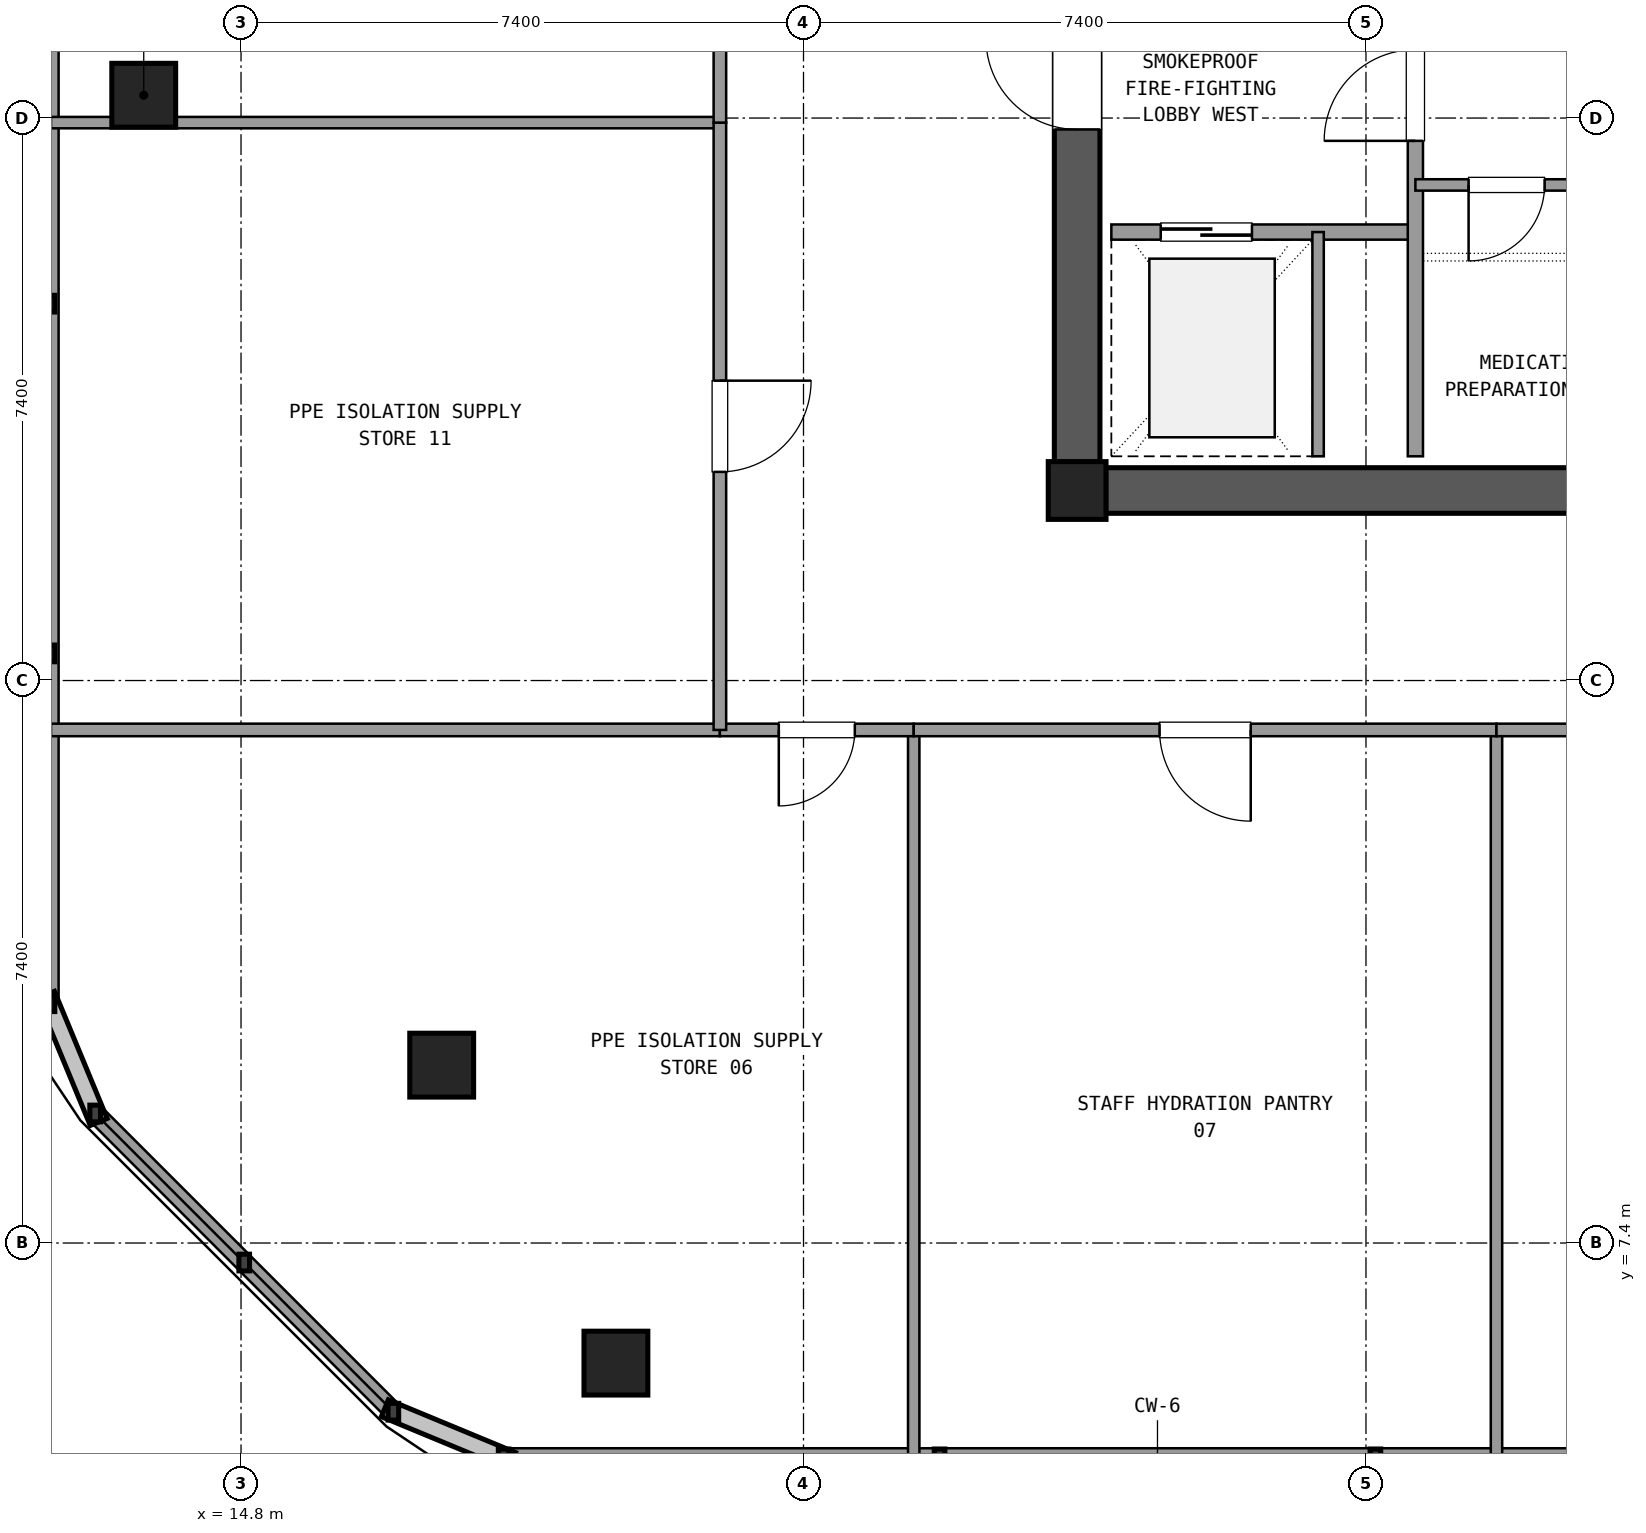
"""IFC4 building model, lengths in metres.
Left out: names, types, materials, properties, quantities, classifications, styles, units other than length and angle.
Written with IfcOpenShell. Run it as: python <this file> out.ifc"""

import sys

from ifc_helpers import new_model, si_unit, direction, frame, frame_2d, origin, origin_2d, place, context, subcontext, project, spatial, rectangle, extrude, element, fill, save


model = new_model("IFC4")
c1 = context("Model", 3, precision=1e-05, world=origin(), true_north=direction((0.0, 1.0)))
c2 = subcontext(c1, "Body", "Model", "MODEL_VIEW")
j1 = project(units=[si_unit("LENGTHUNIT", "METRE"), si_unit("PLANEANGLEUNIT", "RADIAN")], contexts=[c1])
p1 = place(None, origin())
s1 = spatial("IfcSite", under=j1, at=p1, CompositionType="ELEMENT")
p2 = place(p1, origin())
s2 = spatial("IfcBuilding", under=s1, at=p2, CompositionType="ELEMENT")
p3 = place(p2, frame((0.0, 0.0, 264.42)))
s3 = spatial("IfcBuildingStorey", under=s2, at=p3, CompositionType="ELEMENT", Elevation=264.42)
p4 = place(p3, frame((25.8, 17.3, 0.0), z_axis=(0.0, 0.0, 1.0), x_axis=(1.0, 0.0, 0.0)))
e1 = element("IfcColumn", 1, at=p4, inside=s3, PredefinedType="COLUMN", context=c2, shape_type="SweptSolid", body=[
    extrude(rectangle(XDim=0.76, YDim=0.76, at=origin_2d()), origin(), (0.0, 0.0, 1.0), 3.6),
])
p5 = place(p3, frame((26.175, 17.3, 0.0), z_axis=(0.0, 0.0, 1.0), x_axis=(1.0, 0.0, 0.0)))
e2 = element("IfcWall", 2, at=p5, inside=s3, PredefinedType="SHEAR", context=c2, shape_type="SweptSolid", body=[
    extrude(rectangle(XDim=10.45, YDim=0.6, at=frame_2d((5.225, 0.0))), origin(), (0.0, 0.0, 1.0), 3.32),
])
p6 = place(p3, frame((25.8, 25.525, 0.0), z_axis=(0.0, 0.0, 1.0), x_axis=(0.0, -1.0, 0.0)))
e3 = element("IfcWall", 3, at=p6, inside=s3, PredefinedType="SHEAR", context=c2, shape_type="SweptSolid", body=[
    extrude(rectangle(XDim=7.85, YDim=0.6, at=frame_2d((3.925, 0.0))), origin(), (0.0, 0.0, 1.0), 3.32),
])
p7 = place(p6, frame((2.275, 0.0, 0.0)))
e4 = element("IfcOpeningElement", 4, at=p7, cuts=e3, PredefinedType="OPENING", context=c2, shape_type="SweptSolid", body=[
    extrude(rectangle(XDim=1.2, YDim=2.15, at=frame_2d((0.6, 1.075))), frame((0.0, 0.31, 0.0), z_axis=(0.0, -1.0, 0.0), x_axis=(1.0, 0.0, 0.0)), (0.0, 0.0, 1.0), 0.62),
])
for number, where, z_axis, x_axis in (
    (5, (13.52, 22.5, 0.0), (0.0, 0.0, 1.0), (1.0, 0.0, 0.0)),
    (6, (17.44, 9.74, 0.0), (0.0, 0.0, 1.0), (1.0, 0.0, 0.0)),
    (7, (19.732, 5.82, 0.0), (0.0, 0.0, 1.0), (1.0, 0.0, 0.0)),
):
    element("IfcColumn", number, at=place(p3, frame(where, z_axis=z_axis, x_axis=x_axis)), inside=s3, PredefinedType="COLUMN", context=c2, shape_type="SweptSolid", body=[
        extrude(rectangle(XDim=0.84, YDim=0.84, at=origin_2d()), origin(), (0.0, 0.0, 1.0), 3.6),
    ])
p8 = place(p3, frame((18.255, 4.58, 0.0), z_axis=(0.0, 0.0, 1.0), x_axis=(1.0, 0.0, 0.0)))
e8 = element("IfcWall", 8, at=p8, inside=s3, PredefinedType="SOLIDWALL", context=c2, shape_type="SweptSolid", body=[
    extrude(rectangle(XDim=17.204, YDim=0.24, at=frame_2d((8.602, 0.0))), origin(), (0.0, 0.0, 1.0), 0.85),
])
p9 = place(p3, frame((12.28, 24.36, 0.0), z_axis=(0.0, 0.0, 1.0), x_axis=(0.0, -1.0, 0.0)))
e9 = element("IfcWall", 9, at=p9, inside=s3, PredefinedType="SOLIDWALL", context=c2, shape_type="SweptSolid", body=[
    extrude(rectangle(XDim=13.805, YDim=0.24, at=frame_2d((6.903, 0.0))), origin(), (0.0, 0.0, 1.0), 0.85),
])
p10 = place(p3, frame((12.881, 9.104, 0.0), z_axis=(0.0, 0.0, 1.0), x_axis=(0.707084777957, -0.707128783731, 0.0)))
e10 = element("IfcWall", 10, at=p10, inside=s3, PredefinedType="SOLIDWALL", context=c2, shape_type="SweptSolid", body=[
    extrude(rectangle(XDim=5.548, YDim=0.24, at=frame_2d((2.774, 0.0))), origin(), (0.0, 0.0, 1.0), 0.85),
])
p11 = place(p3, frame((26.25, 20.7, 0.0), z_axis=(0.0, 0.0, 1.0), x_axis=(1.0, 0.0, 0.0)))
e11 = element("IfcWall", 11, at=p11, inside=s3, PredefinedType="SOLIDWALL", context=c2, shape_type="SweptSolid", body=[
    extrude(rectangle(XDim=4.0, YDim=0.2, at=frame_2d((2.0, 0.0))), origin(), (0.0, 0.0, 1.0), 2.61),
])
p12 = place(p11, frame((0.65, 0.0, 0.0)))
e12 = element("IfcOpeningElement", 12, at=p12, cuts=e11, PredefinedType="OPENING", context=c2, shape_type="SweptSolid", body=[
    extrude(rectangle(XDim=1.2, YDim=2.15, at=frame_2d((0.6, 1.075))), frame((0.0, 0.11, 0.0), z_axis=(0.0, -1.0, 0.0), x_axis=(1.0, 0.0, 0.0)), (0.0, 0.0, 1.0), 0.22),
])
p13 = place(p3, frame((30.25, 17.75, 0.0), z_axis=(0.0, 0.0, 1.0), x_axis=(0.0, 1.0, 0.0)))
e13 = element("IfcWall", 13, at=p13, inside=s3, PredefinedType="SOLIDWALL", context=c2, shape_type="SweptSolid", body=[
    extrude(rectangle(XDim=6.9, YDim=0.2, at=frame_2d((3.45, 0.0))), origin(), (0.0, 0.0, 1.0), 2.61),
])
p14 = place(p13, frame((4.15, 0.0, 0.0)))
e14 = element("IfcOpeningElement", 14, at=p14, cuts=e13, PredefinedType="OPENING", context=c2, shape_type="SweptSolid", body=[
    extrude(rectangle(XDim=1.2, YDim=2.15, at=frame_2d((0.6, 1.075))), frame((0.0, 0.11, 0.0), z_axis=(0.0, -1.0, 0.0), x_axis=(1.0, 0.0, 0.0)), (0.0, 0.0, 1.0), 0.22),
])
p15 = place(p3, frame((28.97, 17.75, 0.0), z_axis=(0.0, 0.0, 1.0), x_axis=(0.0, 1.0, 0.0)))
e15 = element("IfcWall", 15, at=p15, inside=s3, PredefinedType="PARTITIONING", context=c2, shape_type="SweptSolid", body=[
    extrude(rectangle(XDim=2.95, YDim=0.15, at=frame_2d((1.475, 0.0))), origin(), (0.0, 0.0, 1.0), 2.61),
])
p16 = place(p3, frame((30.25, 21.32, 0.0), z_axis=(0.0, 0.0, 1.0), x_axis=(1.0, 0.0, 0.0)))
e16 = element("IfcWall", 16, at=p16, inside=s3, PredefinedType="PARTITIONING", context=c2, shape_type="SweptSolid", body=[
    extrude(rectangle(XDim=7.0, YDim=0.15, at=frame_2d((3.5, 0.0))), origin(), (0.0, 0.0, 1.0), 2.61),
])
p17 = place(p16, frame((0.7, 0.0, 0.0)))
e17 = element("IfcOpeningElement", 17, at=p17, cuts=e16, PredefinedType="OPENING", context=c2, shape_type="SweptSolid", body=[
    extrude(rectangle(XDim=1.0, YDim=2.15, at=frame_2d((0.5, 1.075))), frame((0.0, 0.085, 0.0), z_axis=(0.0, -1.0, 0.0), x_axis=(1.0, 0.0, 0.0)), (0.0, 0.0, 1.0), 0.17),
])
p18 = place(p16, frame((3.7, 0.0, 0.0)))
e18 = element("IfcOpeningElement", 18, at=p18, cuts=e16, PredefinedType="OPENING", context=c2, shape_type="SweptSolid", body=[
    extrude(rectangle(XDim=1.0, YDim=2.15, at=frame_2d((0.5, 1.075))), frame((0.0, 0.085, 0.0), z_axis=(0.0, -1.0, 0.0), x_axis=(1.0, 0.0, 0.0)), (0.0, 0.0, 1.0), 0.17),
])
p19 = place(p3, frame((12.3, 14.15, 0.0), z_axis=(0.0, 0.0, 1.0), x_axis=(1.0, 0.0, 0.0)))
e19 = element("IfcWall", 19, at=p19, inside=s3, PredefinedType="PARTITIONING", context=c2, shape_type="SweptSolid", body=[
    extrude(rectangle(XDim=8.8, YDim=0.165, at=frame_2d((4.4, 0.0))), origin(), (0.0, 0.0, 1.0), 2.61),
])
p20 = place(p3, frame((23.65, 14.15, 0.0), z_axis=(0.0, 0.0, 1.0), x_axis=(0.0, -1.0, 0.0)))
e20 = element("IfcWall", 20, at=p20, inside=s3, PredefinedType="PARTITIONING", context=c2, shape_type="SweptSolid", body=[
    extrude(rectangle(XDim=9.55, YDim=0.15, at=frame_2d((4.775, 0.0))), origin(), (0.0, 0.0, 1.0), 2.61),
])
p21 = place(p3, frame((21.1, 14.15, 0.0), z_axis=(0.0, 0.0, 1.0), x_axis=(1.0, 0.0, 0.0)))
e21 = element("IfcWall", 21, at=p21, inside=s3, PredefinedType="PARTITIONING", context=c2, shape_type="SweptSolid", body=[
    extrude(rectangle(XDim=2.55, YDim=0.165, at=frame_2d((1.275, 0.0))), origin(), (0.0, 0.0, 1.0), 2.61),
])
p22 = place(p21, frame((0.775, 0.0, 0.0)))
e22 = element("IfcOpeningElement", 22, at=p22, cuts=e21, PredefinedType="OPENING", context=c2, shape_type="SweptSolid", body=[
    extrude(rectangle(XDim=1.0, YDim=2.15, at=frame_2d((0.5, 1.075))), frame((0.0, 0.093, 0.0), z_axis=(0.0, -1.0, 0.0), x_axis=(1.0, 0.0, 0.0)), (0.0, 0.0, 1.0), 0.185),
])
p23 = place(p3, frame((31.317, 14.15, 0.0), z_axis=(0.0, 0.0, 1.0), x_axis=(0.0, -1.0, 0.0)))
e23 = element("IfcWall", 23, at=p23, inside=s3, PredefinedType="PARTITIONING", context=c2, shape_type="SweptSolid", body=[
    extrude(rectangle(XDim=9.55, YDim=0.15, at=frame_2d((4.775, 0.0))), origin(), (0.0, 0.0, 1.0), 2.61),
])
p24 = place(p3, frame((23.65, 14.15, 0.0), z_axis=(0.0, 0.0, 1.0), x_axis=(1.0, 0.0, 0.0)))
e24 = element("IfcWall", 24, at=p24, inside=s3, PredefinedType="PARTITIONING", context=c2, shape_type="SweptSolid", body=[
    extrude(rectangle(XDim=7.667, YDim=0.165, at=frame_2d((3.833, 0.0))), origin(), (0.0, 0.0, 1.0), 2.61),
])
p25 = place(p24, frame((3.234, 0.0, 0.0)))
e25 = element("IfcOpeningElement", 25, at=p25, cuts=e24, PredefinedType="OPENING", context=c2, shape_type="SweptSolid", body=[
    extrude(rectangle(XDim=1.2, YDim=2.15, at=frame_2d((0.6, 1.075))), frame((0.0, 0.093, 0.0), z_axis=(0.0, -1.0, 0.0), x_axis=(1.0, 0.0, 0.0)), (0.0, 0.0, 1.0), 0.185),
])
p26 = place(p3, frame((31.317, 14.15, 0.0), z_axis=(0.0, 0.0, 1.0), x_axis=(1.0, 0.0, 0.0)))
e26 = element("IfcWall", 26, at=p26, inside=s3, PredefinedType="PARTITIONING", context=c2, shape_type="SweptSolid", body=[
    extrude(rectangle(XDim=8.998, YDim=0.165, at=frame_2d((4.499, 0.0))), origin(), (0.0, 0.0, 1.0), 2.61),
])
p27 = place(p26, frame((3.899, 0.0, 0.0)))
e27 = element("IfcOpeningElement", 27, at=p27, cuts=e26, PredefinedType="OPENING", context=c2, shape_type="SweptSolid", body=[
    extrude(rectangle(XDim=1.2, YDim=2.15, at=frame_2d((0.6, 1.075))), frame((0.0, 0.093, 0.0), z_axis=(0.0, -1.0, 0.0), x_axis=(1.0, 0.0, 0.0)), (0.0, 0.0, 1.0), 0.185),
])
p28 = place(p3, frame((21.1, 22.14, 0.0), z_axis=(0.0, 0.0, 1.0), x_axis=(-1.0, 0.0, 0.0)))
e28 = element("IfcWall", 28, at=p28, inside=s3, PredefinedType="PARTITIONING", context=c2, shape_type="SweptSolid", body=[
    extrude(rectangle(XDim=8.8, YDim=0.15, at=frame_2d((4.4, 0.0))), origin(), (0.0, 0.0, 1.0), 2.61),
])
p29 = place(p3, frame((21.1, 14.15, 0.0), z_axis=(0.0, 0.0, 1.0), x_axis=(0.0, 1.0, 0.0)))
e29 = element("IfcWall", 29, at=p29, inside=s3, PredefinedType="PARTITIONING", context=c2, shape_type="SweptSolid", body=[
    extrude(rectangle(XDim=7.99, YDim=0.165, at=frame_2d((3.995, 0.0))), origin(), (0.0, 0.0, 1.0), 2.61),
])
p30 = place(p29, frame((3.395, 0.0, 0.0)))
e30 = element("IfcOpeningElement", 30, at=p30, cuts=e29, PredefinedType="OPENING", context=c2, shape_type="SweptSolid", body=[
    extrude(rectangle(XDim=1.2, YDim=2.15, at=frame_2d((0.6, 1.075))), frame((0.0, 0.093, 0.0), z_axis=(0.0, -1.0, 0.0), x_axis=(1.0, 0.0, 0.0)), (0.0, 0.0, 1.0), 0.185),
])
p31 = place(p3, frame((21.1, 22.14, 0.0), z_axis=(0.0, 0.0, 1.0), x_axis=(0.0, 1.0, 0.0)))
e31 = element("IfcWall", 31, at=p31, inside=s3, PredefinedType="PARTITIONING", context=c2, shape_type="SweptSolid", body=[
    extrude(rectangle(XDim=7.99, YDim=0.165, at=frame_2d((3.995, 0.0))), origin(), (0.0, 0.0, 1.0), 2.61),
])
p32 = place(p31, frame((3.395, 0.0, 0.0)))
e32 = element("IfcOpeningElement", 32, at=p32, cuts=e31, PredefinedType="OPENING", context=c2, shape_type="SweptSolid", body=[
    extrude(rectangle(XDim=1.2, YDim=2.15, at=frame_2d((0.6, 1.075))), frame((0.0, 0.093, 0.0), z_axis=(0.0, -1.0, 0.0), x_axis=(1.0, 0.0, 0.0)), (0.0, 0.0, 1.0), 0.185),
])
p33 = place(p12, origin())
e33 = element("IfcDoor", 33, at=p33, inside=s3, OperationType="SLIDING_TO_LEFT", PredefinedType="DOOR", context=c2, shape_type="SweptSolid", body=[
    extrude(rectangle(XDim=1.2, YDim=2.15, at=frame_2d((0.6, 1.075))), frame((0.0, 0.025, 0.0), z_axis=(0.0, -1.0, 0.0), x_axis=(1.0, 0.0, 0.0)), (0.0, 0.0, 1.0), 0.05),
])
fill(e12, e33)
p34 = place(p14, origin())
e34 = element("IfcDoor", 34, at=p34, inside=s3, OperationType="SINGLE_SWING_LEFT", PredefinedType="DOOR", context=c2, shape_type="SweptSolid", body=[
    extrude(rectangle(XDim=1.2, YDim=2.15, at=frame_2d((0.6, 1.075))), frame((0.0, 0.025, 0.0), z_axis=(0.0, -1.0, 0.0), x_axis=(1.0, 0.0, 0.0)), (0.0, 0.0, 1.0), 0.05),
])
fill(e14, e34)
p35 = place(p7, frame((1.2, 0.0, 0.0), z_axis=(0.0, 0.0, 1.0), x_axis=(-1.0, 0.0, 0.0)))
e35 = element("IfcDoor", 35, at=p35, inside=s3, OperationType="SINGLE_SWING_LEFT", PredefinedType="DOOR", context=c2, shape_type="SweptSolid", body=[
    extrude(rectangle(XDim=1.2, YDim=2.15, at=frame_2d((0.6, 1.075))), frame((0.0, 0.025, 0.0), z_axis=(0.0, -1.0, 0.0), x_axis=(1.0, 0.0, 0.0)), (0.0, 0.0, 1.0), 0.05),
])
fill(e4, e35)
p36 = place(p17, frame((1.0, 0.0, 0.0), z_axis=(0.0, 0.0, 1.0), x_axis=(-1.0, 0.0, 0.0)))
e36 = element("IfcDoor", 36, at=p36, inside=s3, OperationType="SINGLE_SWING_LEFT", PredefinedType="DOOR", context=c2, shape_type="SweptSolid", body=[
    extrude(rectangle(XDim=1.0, YDim=2.15, at=frame_2d((0.5, 1.075))), frame((0.0, 0.025, 0.0), z_axis=(0.0, -1.0, 0.0), x_axis=(1.0, 0.0, 0.0)), (0.0, 0.0, 1.0), 0.05),
])
fill(e17, e36)
p37 = place(p22, frame((1.0, 0.0, 0.0), z_axis=(0.0, 0.0, 1.0), x_axis=(-1.0, 0.0, 0.0)))
e37 = element("IfcDoor", 37, at=p37, inside=s3, OperationType="SINGLE_SWING_LEFT", PredefinedType="DOOR", context=c2, shape_type="SweptSolid", body=[
    extrude(rectangle(XDim=1.0, YDim=2.15, at=frame_2d((0.5, 1.075))), frame((0.0, 0.025, 0.0), z_axis=(0.0, -1.0, 0.0), x_axis=(1.0, 0.0, 0.0)), (0.0, 0.0, 1.0), 0.05),
])
fill(e22, e37)
p38 = place(p25, frame((1.2, 0.0, 0.0), z_axis=(0.0, 0.0, 1.0), x_axis=(-1.0, 0.0, 0.0)))
e38 = element("IfcDoor", 38, at=p38, inside=s3, OperationType="SINGLE_SWING_RIGHT", PredefinedType="DOOR", context=c2, shape_type="SweptSolid", body=[
    extrude(rectangle(XDim=1.2, YDim=2.15, at=frame_2d((0.6, 1.075))), frame((0.0, 0.025, 0.0), z_axis=(0.0, -1.0, 0.0), x_axis=(1.0, 0.0, 0.0)), (0.0, 0.0, 1.0), 0.05),
])
fill(e25, e38)
p39 = place(p30, frame((1.2, 0.0, 0.0), z_axis=(0.0, 0.0, 1.0), x_axis=(-1.0, 0.0, 0.0)))
e39 = element("IfcDoor", 39, at=p39, inside=s3, OperationType="SINGLE_SWING_RIGHT", PredefinedType="DOOR", context=c2, shape_type="SweptSolid", body=[
    extrude(rectangle(XDim=1.2, YDim=2.15, at=frame_2d((0.6, 1.075))), frame((0.0, 0.025, 0.0), z_axis=(0.0, -1.0, 0.0), x_axis=(1.0, 0.0, 0.0)), (0.0, 0.0, 1.0), 0.05),
])
fill(e30, e39)
save(model, sys.argv[1])
